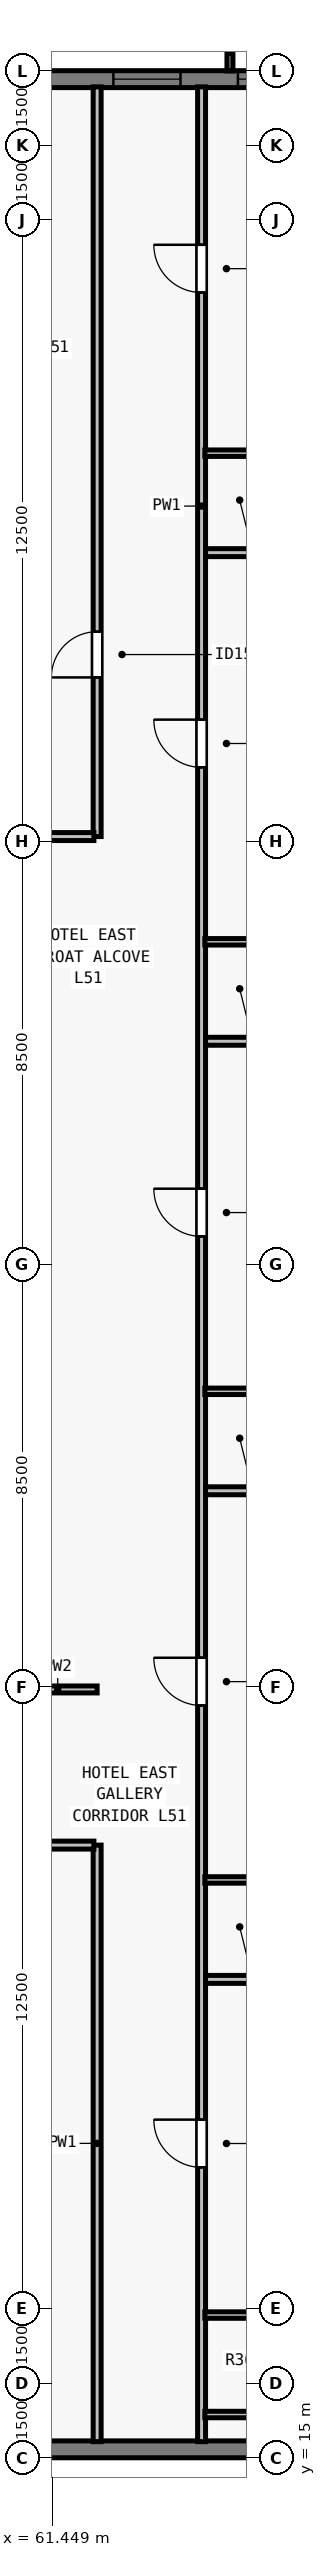
"""IFC4 building model, lengths in metres.
Left out: names, types, materials, properties, quantities, classifications, styles, units other than length and angle.
Written with IfcOpenShell. Run it as: python <this file> out.ifc"""

import sys

from ifc_helpers import new_model, si_unit, direction, frame, frame_2d, origin, place, context, subcontext, project, spatial, rectangle, extrude, element, fill, save


model = new_model("IFC4")
c1 = context("Model", 3, precision=1e-05, world=origin(), true_north=direction((0.0, 1.0)))
c2 = subcontext(c1, "Body", "Model", "MODEL_VIEW")
j1 = project(units=[si_unit("LENGTHUNIT", "METRE"), si_unit("PLANEANGLEUNIT", "RADIAN")], contexts=[c1])
p1 = place(None, origin())
s1 = spatial("IfcSite", under=j1, at=p1, CompositionType="ELEMENT")
p2 = place(p1, origin())
s2 = spatial("IfcBuilding", under=s1, at=p2, CompositionType="ELEMENT")
p3 = place(p2, frame((0.0, 0.0, 186.5)))
s3 = spatial("IfcBuildingStorey", under=s2, at=p3, CompositionType="ELEMENT", Elevation=186.5)
p4 = place(p3, frame((72.0, 15.17, 0.0), z_axis=(0.0, 0.0, 1.0), x_axis=(-1.0, 0.0, 0.0)))
e1 = element("IfcWall", 1, at=p4, inside=s3, PredefinedType="SOLIDWALL", context=c2, shape_type="SweptSolid", body=[
    extrude(rectangle(XDim=39.682, YDim=0.34, at=frame_2d((19.841, 0.0))), origin(), (0.0, 0.0, 1.0), 3.28),
])
p5 = place(p4, frame((11.859, 0.0, 0.8)))
e2 = element("IfcOpeningElement", 2, at=p5, cuts=e1, PredefinedType="OPENING", context=c2, shape_type="SweptSolid", body=[
    extrude(rectangle(XDim=1.75, YDim=1.66, at=frame_2d((0.875, 0.83))), frame((0.0, 0.18, 0.0), z_axis=(0.0, -1.0, 0.0), x_axis=(1.0, 0.0, 0.0)), (0.0, 0.0, 1.0), 0.36),
])
p6 = place(p4, frame((18.966, 0.0, 0.8)))
e3 = element("IfcOpeningElement", 3, at=p6, cuts=e1, PredefinedType="OPENING", context=c2, shape_type="SweptSolid", body=[
    extrude(rectangle(XDim=1.75, YDim=1.66, at=frame_2d((0.875, 0.83))), frame((0.0, 0.18, 0.0), z_axis=(0.0, -1.0, 0.0), x_axis=(1.0, 0.0, 0.0)), (0.0, 0.0, 1.0), 0.36),
])
p7 = place(p4, frame((22.27, 0.0, 0.8)))
e4 = element("IfcOpeningElement", 4, at=p7, cuts=e1, PredefinedType="OPENING", context=c2, shape_type="SweptSolid", body=[
    extrude(rectangle(XDim=1.35, YDim=1.66, at=frame_2d((0.675, 0.83))), frame((0.0, 0.18, 0.0), z_axis=(0.0, -1.0, 0.0), x_axis=(1.0, 0.0, 0.0)), (0.0, 0.0, 1.0), 0.36),
])
p8 = place(p4, frame((26.073, 0.0, 0.8)))
e5 = element("IfcOpeningElement", 5, at=p8, cuts=e1, PredefinedType="OPENING", context=c2, shape_type="SweptSolid", body=[
    extrude(rectangle(XDim=1.75, YDim=1.66, at=frame_2d((0.875, 0.83))), frame((0.0, 0.18, 0.0), z_axis=(0.0, -1.0, 0.0), x_axis=(1.0, 0.0, 0.0)), (0.0, 0.0, 1.0), 0.36),
])
p9 = place(p4, frame((29.827, 0.0, 0.8)))
e6 = element("IfcOpeningElement", 6, at=p9, cuts=e1, PredefinedType="OPENING", context=c2, shape_type="SweptSolid", body=[
    extrude(rectangle(XDim=1.35, YDim=1.66, at=frame_2d((0.675, 0.83))), frame((0.0, 0.18, 0.0), z_axis=(0.0, -1.0, 0.0), x_axis=(1.0, 0.0, 0.0)), (0.0, 0.0, 1.0), 0.36),
])
p10 = place(p3, frame((32.0, 62.83, 0.0), z_axis=(0.0, 0.0, 1.0), x_axis=(1.0, 0.0, 0.0)))
e7 = element("IfcWall", 7, at=p10, inside=s3, PredefinedType="SOLIDWALL", context=c2, shape_type="SweptSolid", body=[
    extrude(rectangle(XDim=39.682, YDim=0.34, at=frame_2d((19.841, 0.0))), origin(), (0.0, 0.0, 1.0), 3.28),
])
p11 = place(p10, frame((3.902, 0.0, 0.8)))
e8 = element("IfcOpeningElement", 8, at=p11, cuts=e7, PredefinedType="OPENING", context=c2, shape_type="SweptSolid", body=[
    extrude(rectangle(XDim=1.75, YDim=1.66, at=frame_2d((0.875, 0.83))), frame((0.0, 0.18, 0.0), z_axis=(0.0, -1.0, 0.0), x_axis=(1.0, 0.0, 0.0)), (0.0, 0.0, 1.0), 0.36),
])
p12 = place(p10, frame((8.505, 0.0, 0.8)))
e9 = element("IfcOpeningElement", 9, at=p12, cuts=e7, PredefinedType="OPENING", context=c2, shape_type="SweptSolid", body=[
    extrude(rectangle(XDim=1.35, YDim=1.66, at=frame_2d((0.675, 0.83))), frame((0.0, 0.18, 0.0), z_axis=(0.0, -1.0, 0.0), x_axis=(1.0, 0.0, 0.0)), (0.0, 0.0, 1.0), 0.36),
])
p13 = place(p10, frame((11.859, 0.0, 0.8)))
e10 = element("IfcOpeningElement", 10, at=p13, cuts=e7, PredefinedType="OPENING", context=c2, shape_type="SweptSolid", body=[
    extrude(rectangle(XDim=1.75, YDim=1.66, at=frame_2d((0.875, 0.83))), frame((0.0, 0.18, 0.0), z_axis=(0.0, -1.0, 0.0), x_axis=(1.0, 0.0, 0.0)), (0.0, 0.0, 1.0), 0.36),
])
p14 = place(p10, frame((16.062, 0.0, 0.8)))
e11 = element("IfcOpeningElement", 11, at=p14, cuts=e7, PredefinedType="OPENING", context=c2, shape_type="SweptSolid", body=[
    extrude(rectangle(XDim=1.35, YDim=1.66, at=frame_2d((0.675, 0.83))), frame((0.0, 0.18, 0.0), z_axis=(0.0, -1.0, 0.0), x_axis=(1.0, 0.0, 0.0)), (0.0, 0.0, 1.0), 0.36),
])
p15 = place(p10, frame((17.716, 0.0, 0.8)))
e12 = element("IfcOpeningElement", 12, at=p15, cuts=e7, PredefinedType="OPENING", context=c2, shape_type="SweptSolid", body=[
    extrude(rectangle(XDim=1.75, YDim=1.66, at=frame_2d((0.875, 0.83))), frame((0.0, 0.18, 0.0), z_axis=(0.0, -1.0, 0.0), x_axis=(1.0, 0.0, 0.0)), (0.0, 0.0, 1.0), 0.36),
])
p16 = place(p10, frame((22.719, 0.0, 0.8)))
e13 = element("IfcOpeningElement", 13, at=p16, cuts=e7, PredefinedType="OPENING", context=c2, shape_type="SweptSolid", body=[
    extrude(rectangle(XDim=1.35, YDim=1.66, at=frame_2d((0.675, 0.83))), frame((0.0, 0.18, 0.0), z_axis=(0.0, -1.0, 0.0), x_axis=(1.0, 0.0, 0.0)), (0.0, 0.0, 1.0), 0.36),
])
p17 = place(p10, frame((26.073, 0.0, 0.8)))
e14 = element("IfcOpeningElement", 14, at=p17, cuts=e7, PredefinedType="OPENING", context=c2, shape_type="SweptSolid", body=[
    extrude(rectangle(XDim=1.75, YDim=1.66, at=frame_2d((0.875, 0.83))), frame((0.0, 0.18, 0.0), z_axis=(0.0, -1.0, 0.0), x_axis=(1.0, 0.0, 0.0)), (0.0, 0.0, 1.0), 0.36),
])
p18 = place(p10, frame((30.677, 0.0, 0.8)))
e15 = element("IfcOpeningElement", 15, at=p18, cuts=e7, PredefinedType="OPENING", context=c2, shape_type="SweptSolid", body=[
    extrude(rectangle(XDim=1.35, YDim=1.66, at=frame_2d((0.675, 0.83))), frame((0.0, 0.18, 0.0), z_axis=(0.0, -1.0, 0.0), x_axis=(1.0, 0.0, 0.0)), (0.0, 0.0, 1.0), 0.36),
])
p19 = place(p10, frame((33.18, 0.0, 0.8)))
e16 = element("IfcOpeningElement", 16, at=p19, cuts=e7, PredefinedType="OPENING", context=c2, shape_type="SweptSolid", body=[
    extrude(rectangle(XDim=1.75, YDim=1.66, at=frame_2d((0.875, 0.83))), frame((0.0, 0.18, 0.0), z_axis=(0.0, -1.0, 0.0), x_axis=(1.0, 0.0, 0.0)), (0.0, 0.0, 1.0), 0.36),
])
p20 = place(p3, frame((64.45, 15.325, 0.0), z_axis=(0.0, 0.0, 1.0), x_axis=(0.0, 1.0, 0.0)))
e17 = element("IfcWall", 17, at=p20, inside=s3, PredefinedType="PARTITIONING", context=c2, shape_type="SweptSolid", body=[
    extrude(rectangle(XDim=47.35, YDim=0.16, at=frame_2d((23.675, 0.0))), origin(), (0.0, 0.0, 1.0), 2.555),
])
p21 = place(p20, frame((5.515, 0.0, 0.0)))
e18 = element("IfcOpeningElement", 18, at=p21, cuts=e17, PredefinedType="OPENING", context=c2, shape_type="SweptSolid", body=[
    extrude(rectangle(XDim=0.96, YDim=2.15, at=frame_2d((0.48, 1.075))), frame((0.0, 0.09, 0.0), z_axis=(0.0, -1.0, 0.0), x_axis=(1.0, 0.0, 0.0)), (0.0, 0.0, 1.0), 0.18),
])
p22 = place(p20, frame((14.802, 0.0, 0.0)))
e19 = element("IfcOpeningElement", 19, at=p22, cuts=e17, PredefinedType="OPENING", context=c2, shape_type="SweptSolid", body=[
    extrude(rectangle(XDim=0.96, YDim=2.15, at=frame_2d((0.48, 1.075))), frame((0.0, 0.09, 0.0), z_axis=(0.0, -1.0, 0.0), x_axis=(1.0, 0.0, 0.0)), (0.0, 0.0, 1.0), 0.18),
])
p23 = place(p20, frame((24.234, 0.0, 0.0)))
e20 = element("IfcOpeningElement", 20, at=p23, cuts=e17, PredefinedType="OPENING", context=c2, shape_type="SweptSolid", body=[
    extrude(rectangle(XDim=0.96, YDim=2.15, at=frame_2d((0.48, 1.075))), frame((0.0, 0.09, 0.0), z_axis=(0.0, -1.0, 0.0), x_axis=(1.0, 0.0, 0.0)), (0.0, 0.0, 1.0), 0.18),
])
p24 = place(p20, frame((33.666, 0.0, 0.0)))
e21 = element("IfcOpeningElement", 21, at=p24, cuts=e17, PredefinedType="OPENING", context=c2, shape_type="SweptSolid", body=[
    extrude(rectangle(XDim=0.96, YDim=2.15, at=frame_2d((0.48, 1.075))), frame((0.0, 0.09, 0.0), z_axis=(0.0, -1.0, 0.0), x_axis=(1.0, 0.0, 0.0)), (0.0, 0.0, 1.0), 0.18),
])
p25 = place(p20, frame((43.214, 0.0, 0.0)))
e22 = element("IfcOpeningElement", 22, at=p25, cuts=e17, PredefinedType="OPENING", context=c2, shape_type="SweptSolid", body=[
    extrude(rectangle(XDim=0.96, YDim=2.15, at=frame_2d((0.48, 1.075))), frame((0.0, 0.09, 0.0), z_axis=(0.0, -1.0, 0.0), x_axis=(1.0, 0.0, 0.0)), (0.0, 0.0, 1.0), 0.18),
])
p26 = place(p3, frame((62.35, 15.325, 0.0), z_axis=(0.0, 0.0, 1.0), x_axis=(0.0, 1.0, 0.0)))
e23 = element("IfcWall", 23, at=p26, inside=s3, PredefinedType="PARTITIONING", context=c2, shape_type="SweptSolid", body=[
    extrude(rectangle(XDim=11.995, YDim=0.16, at=frame_2d((5.998, 0.0))), origin(), (0.0, 0.0, 1.0), 3.28),
])
p27 = place(p3, frame((62.35, 47.6, 0.0), z_axis=(0.0, 0.0, 1.0), x_axis=(0.0, 1.0, 0.0)))
e24 = element("IfcWall", 24, at=p27, inside=s3, PredefinedType="PARTITIONING", context=c2, shape_type="SweptSolid", body=[
    extrude(rectangle(XDim=15.075, YDim=0.16, at=frame_2d((7.538, 0.0))), origin(), (0.0, 0.0, 1.0), 2.555),
])
p28 = place(p27, frame((3.2, 0.0, 0.0)))
e25 = element("IfcOpeningElement", 25, at=p28, cuts=e24, PredefinedType="OPENING", context=c2, shape_type="SweptSolid", body=[
    extrude(rectangle(XDim=0.92, YDim=2.12, at=frame_2d((0.46, 1.06))), frame((0.0, 0.09, 0.0), z_axis=(0.0, -1.0, 0.0), x_axis=(1.0, 0.0, 0.0)), (0.0, 0.0, 1.0), 0.18),
])
p29 = place(p3, frame((60.765, 30.45, 0.0), z_axis=(0.0, 0.0, 1.0), x_axis=(1.0, 0.0, 0.0)))
e26 = element("IfcWall", 26, at=p29, inside=s3, PredefinedType="PARTITIONING", context=c2, shape_type="SweptSolid", body=[
    extrude(rectangle(XDim=1.585, YDim=0.14, at=frame_2d((0.792, 0.0))), origin(), (0.0, 0.0, 1.0), 3.28),
])
p30 = place(p3, frame((60.765, 47.6, 0.0), z_axis=(0.0, 0.0, 1.0), x_axis=(1.0, 0.0, 0.0)))
e27 = element("IfcWall", 27, at=p30, inside=s3, PredefinedType="PARTITIONING", context=c2, shape_type="SweptSolid", body=[
    extrude(rectangle(XDim=1.52, YDim=0.16, at=frame_2d((0.76, 0.0))), origin(), (0.0, 0.0, 1.0), 3.28),
])
p31 = place(p3, frame((40.215, 27.32, 0.0), z_axis=(0.0, 0.0, 1.0), x_axis=(1.0, 0.0, 0.0)))
e28 = element("IfcWall", 28, at=p31, inside=s3, PredefinedType="PARTITIONING", context=c2, shape_type="SweptSolid", body=[
    extrude(rectangle(XDim=22.07, YDim=0.16, at=frame_2d((11.035, 0.0))), origin(), (0.0, 0.0, 1.0), 3.28),
])
p32 = place(p31, frame((3.587, 0.0, 0.0)))
e29 = element("IfcOpeningElement", 29, at=p32, cuts=e28, PredefinedType="OPENING", context=c2, shape_type="SweptSolid", body=[
    extrude(rectangle(XDim=0.96, YDim=2.12, at=frame_2d((0.48, 1.06))), frame((0.0, 0.09, 0.0), z_axis=(0.0, -1.0, 0.0), x_axis=(1.0, 0.0, 0.0)), (0.0, 0.0, 1.0), 0.18),
])
p33 = place(p31, frame((10.61, 0.0, 0.0)))
e30 = element("IfcOpeningElement", 30, at=p33, cuts=e28, PredefinedType="OPENING", context=c2, shape_type="SweptSolid", body=[
    extrude(rectangle(XDim=0.96, YDim=2.12, at=frame_2d((0.48, 1.06))), frame((0.0, 0.09, 0.0), z_axis=(0.0, -1.0, 0.0), x_axis=(1.0, 0.0, 0.0)), (0.0, 0.0, 1.0), 0.18),
])
p34 = place(p31, frame((17.578, 0.0, 0.0)))
e31 = element("IfcOpeningElement", 31, at=p34, cuts=e28, PredefinedType="OPENING", context=c2, shape_type="SweptSolid", body=[
    extrude(rectangle(XDim=0.96, YDim=2.12, at=frame_2d((0.48, 1.06))), frame((0.0, 0.09, 0.0), z_axis=(0.0, -1.0, 0.0), x_axis=(1.0, 0.0, 0.0)), (0.0, 0.0, 1.0), 0.18),
])
for number, where, z_axis, x_axis in (
    (32, (64.515, 15.87, 0.0), (0.0, 0.0, 1.0), (1.0, 0.0, 0.0)),
    (33, (64.515, 17.87, 0.0), (0.0, 0.0, 1.0), (1.0, 0.0, 0.0)),
):
    element("IfcWall", number, at=place(p3, frame(where, z_axis=z_axis, x_axis=x_axis)), inside=s3, PredefinedType="PLUMBINGWALL", context=c2, shape_type="SweptSolid", body=[
        extrude(rectangle(XDim=2.315, YDim=0.13, at=frame_2d((1.158, 0.0))), origin(), (0.0, 0.0, 1.0), 3.28),
    ])
p35 = place(p3, frame((64.53, 24.62, 0.0), z_axis=(0.0, 0.0, 1.0), x_axis=(1.0, 0.0, 0.0)))
e34 = element("IfcWall", 34, at=p35, inside=s3, PredefinedType="PARTITIONING", context=c2, shape_type="SweptSolid", body=[
    extrude(rectangle(XDim=11.145, YDim=0.16, at=frame_2d((5.573, 0.0))), origin(), (0.0, 0.0, 1.0), 2.896),
])
p36 = place(p3, frame((64.515, 26.62, 0.0), z_axis=(0.0, 0.0, 1.0), x_axis=(1.0, 0.0, 0.0)))
e35 = element("IfcWall", 35, at=p36, inside=s3, PredefinedType="PLUMBINGWALL", context=c2, shape_type="SweptSolid", body=[
    extrude(rectangle(XDim=2.315, YDim=0.13, at=frame_2d((1.158, 0.0))), origin(), (0.0, 0.0, 1.0), 2.896),
])
p37 = place(p3, frame((64.53, 34.445, 0.0), z_axis=(0.0, 0.0, 1.0), x_axis=(1.0, 0.0, 0.0)))
e36 = element("IfcWall", 36, at=p37, inside=s3, PredefinedType="PARTITIONING", context=c2, shape_type="SweptSolid", body=[
    extrude(rectangle(XDim=11.145, YDim=0.16, at=frame_2d((5.573, 0.0))), origin(), (0.0, 0.0, 1.0), 3.28),
])
p38 = place(p3, frame((64.515, 36.445, 0.0), z_axis=(0.0, 0.0, 1.0), x_axis=(1.0, 0.0, 0.0)))
e37 = element("IfcWall", 37, at=p38, inside=s3, PredefinedType="PLUMBINGWALL", context=c2, shape_type="SweptSolid", body=[
    extrude(rectangle(XDim=2.315, YDim=0.13, at=frame_2d((1.158, 0.0))), origin(), (0.0, 0.0, 1.0), 3.28),
])
p39 = place(p3, frame((64.53, 43.484, 0.0), z_axis=(0.0, 0.0, 1.0), x_axis=(1.0, 0.0, 0.0)))
e38 = element("IfcWall", 38, at=p39, inside=s3, PredefinedType="PARTITIONING", context=c2, shape_type="SweptSolid", body=[
    extrude(rectangle(XDim=11.145, YDim=0.16, at=frame_2d((5.573, 0.0))), origin(), (0.0, 0.0, 1.0), 3.28),
])
p40 = place(p3, frame((64.515, 45.484, 0.0), z_axis=(0.0, 0.0, 1.0), x_axis=(1.0, 0.0, 0.0)))
e39 = element("IfcWall", 39, at=p40, inside=s3, PredefinedType="PLUMBINGWALL", context=c2, shape_type="SweptSolid", body=[
    extrude(rectangle(XDim=2.315, YDim=0.13, at=frame_2d((1.158, 0.0))), origin(), (0.0, 0.0, 1.0), 3.28),
])
p41 = place(p3, frame((64.53, 53.309, 0.0), z_axis=(0.0, 0.0, 1.0), x_axis=(1.0, 0.0, 0.0)))
e40 = element("IfcWall", 40, at=p41, inside=s3, PredefinedType="PARTITIONING", context=c2, shape_type="SweptSolid", body=[
    extrude(rectangle(XDim=11.145, YDim=0.16, at=frame_2d((5.573, 0.0))), origin(), (0.0, 0.0, 1.0), 2.896),
])
p42 = place(p3, frame((64.515, 55.309, 0.0), z_axis=(0.0, 0.0, 1.0), x_axis=(1.0, 0.0, 0.0)))
e41 = element("IfcWall", 41, at=p42, inside=s3, PredefinedType="PLUMBINGWALL", context=c2, shape_type="SweptSolid", body=[
    extrude(rectangle(XDim=2.315, YDim=0.13, at=frame_2d((1.158, 0.0))), origin(), (0.0, 0.0, 1.0), 3.28),
])
p43 = place(p18, origin())
e42 = element("IfcWindow", 42, at=p43, inside=s3, PartitioningType="SINGLE_PANEL", PredefinedType="WINDOW", context=c2, shape_type="SweptSolid", body=[
    extrude(rectangle(XDim=1.35, YDim=1.66, at=frame_2d((0.675, 0.83))), frame((0.0, -0.05, 0.0), z_axis=(0.0, -1.0, 0.0), x_axis=(1.0, 0.0, 0.0)), (0.0, 0.0, 1.0), 0.06),
])
fill(e15, e42)
p44 = place(p19, origin())
e43 = element("IfcWindow", 43, at=p44, inside=s3, PartitioningType="SINGLE_PANEL", PredefinedType="WINDOW", context=c2, shape_type="SweptSolid", body=[
    extrude(rectangle(XDim=1.75, YDim=1.66, at=frame_2d((0.875, 0.83))), frame((0.0, -0.05, 0.0), z_axis=(0.0, -1.0, 0.0), x_axis=(1.0, 0.0, 0.0)), (0.0, 0.0, 1.0), 0.06),
])
fill(e16, e43)
p45 = place(p28, origin())
e44 = element("IfcDoor", 44, at=p45, inside=s3, OperationType="SINGLE_SWING_LEFT", PredefinedType="DOOR", context=c2, shape_type="SweptSolid", body=[
    extrude(rectangle(XDim=0.92, YDim=2.12, at=frame_2d((0.46, 1.06))), frame((0.0, 0.025, 0.0), z_axis=(0.0, -1.0, 0.0), x_axis=(1.0, 0.0, 0.0)), (0.0, 0.0, 1.0), 0.05),
])
fill(e25, e44)
p46 = place(p21, origin())
e45 = element("IfcDoor", 45, at=p46, inside=s3, OperationType="SINGLE_SWING_RIGHT", PredefinedType="DOOR", context=c2, shape_type="SweptSolid", body=[
    extrude(rectangle(XDim=0.96, YDim=2.15, at=frame_2d((0.48, 1.075))), frame((0.0, 0.025, 0.0), z_axis=(0.0, -1.0, 0.0), x_axis=(1.0, 0.0, 0.0)), (0.0, 0.0, 1.0), 0.05),
])
fill(e18, e45)
p47 = place(p22, origin())
e46 = element("IfcDoor", 46, at=p47, inside=s3, OperationType="SINGLE_SWING_RIGHT", PredefinedType="DOOR", context=c2, shape_type="SweptSolid", body=[
    extrude(rectangle(XDim=0.96, YDim=2.15, at=frame_2d((0.48, 1.075))), frame((0.0, 0.025, 0.0), z_axis=(0.0, -1.0, 0.0), x_axis=(1.0, 0.0, 0.0)), (0.0, 0.0, 1.0), 0.05),
])
fill(e19, e46)
p48 = place(p23, origin())
e47 = element("IfcDoor", 47, at=p48, inside=s3, OperationType="SINGLE_SWING_RIGHT", PredefinedType="DOOR", context=c2, shape_type="SweptSolid", body=[
    extrude(rectangle(XDim=0.96, YDim=2.15, at=frame_2d((0.48, 1.075))), frame((0.0, 0.025, 0.0), z_axis=(0.0, -1.0, 0.0), x_axis=(1.0, 0.0, 0.0)), (0.0, 0.0, 1.0), 0.05),
])
fill(e20, e47)
p49 = place(p24, origin())
e48 = element("IfcDoor", 48, at=p49, inside=s3, OperationType="SINGLE_SWING_RIGHT", PredefinedType="DOOR", context=c2, shape_type="SweptSolid", body=[
    extrude(rectangle(XDim=0.96, YDim=2.15, at=frame_2d((0.48, 1.075))), frame((0.0, 0.025, 0.0), z_axis=(0.0, -1.0, 0.0), x_axis=(1.0, 0.0, 0.0)), (0.0, 0.0, 1.0), 0.05),
])
fill(e21, e48)
p50 = place(p25, origin())
e49 = element("IfcDoor", 49, at=p50, inside=s3, OperationType="SINGLE_SWING_RIGHT", PredefinedType="DOOR", context=c2, shape_type="SweptSolid", body=[
    extrude(rectangle(XDim=0.96, YDim=2.15, at=frame_2d((0.48, 1.075))), frame((0.0, 0.025, 0.0), z_axis=(0.0, -1.0, 0.0), x_axis=(1.0, 0.0, 0.0)), (0.0, 0.0, 1.0), 0.05),
])
fill(e22, e49)
save(model, sys.argv[1])
